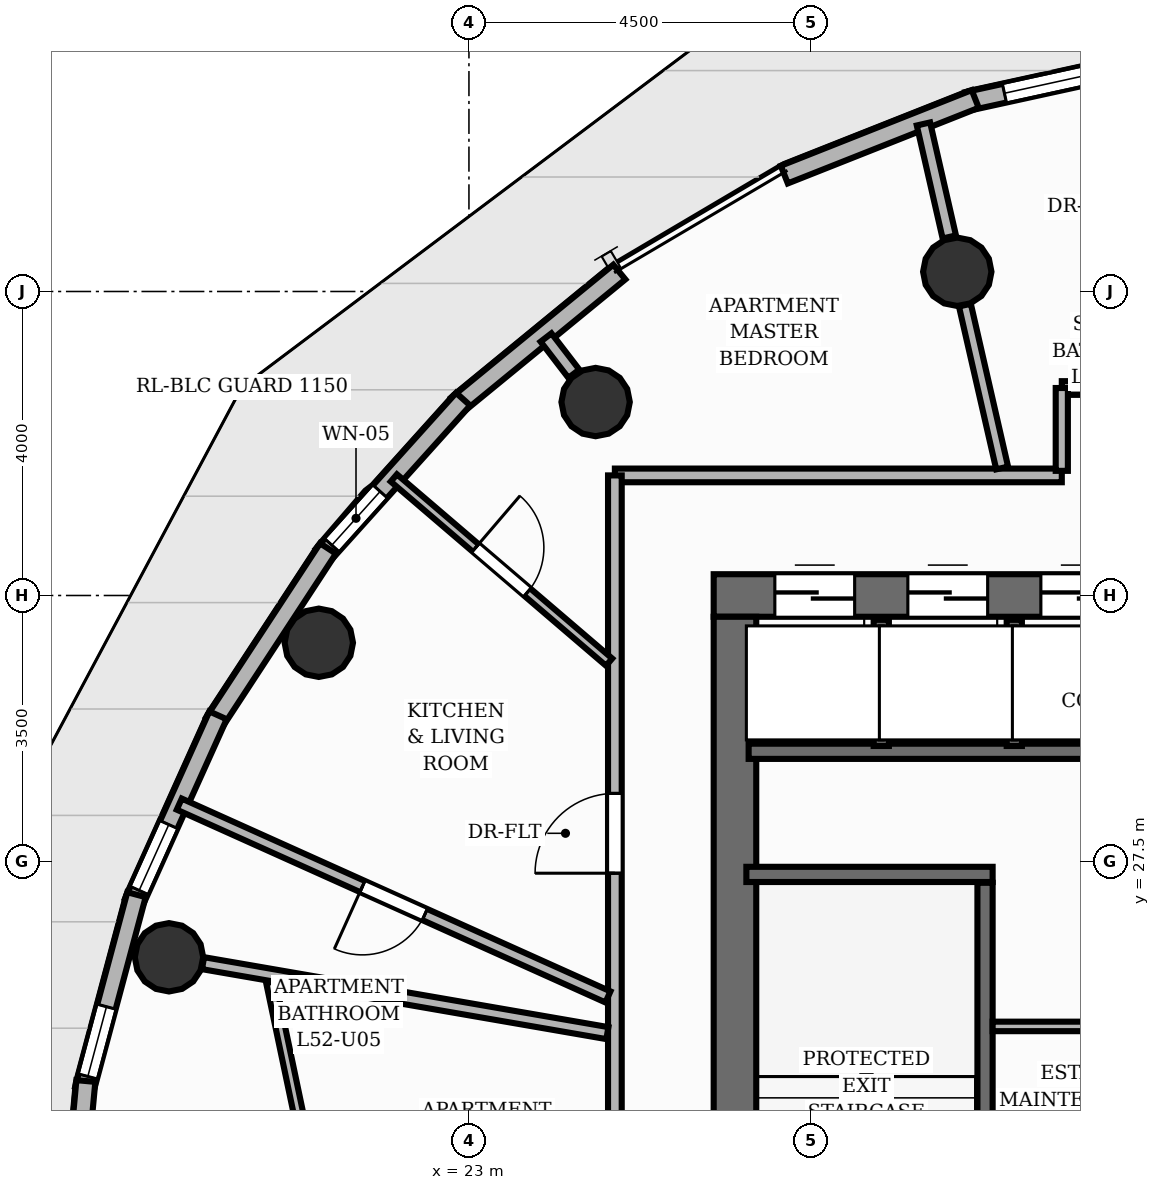
"""IFC4 building model, lengths in metres.
Left out: names, types, materials, properties, quantities, classifications, styles, units other than length and angle.
Written with IfcOpenShell. Run it as: python <this file> out.ifc"""

import sys

from ifc_helpers import new_model, si_unit, direction, frame, frame_2d, origin, origin_2d, place, context, subcontext, project, spatial, rectangle, circle, extrude, element, fill, save


model = new_model("IFC4")
c1 = context("Model", 3, precision=1e-05, world=origin(), true_north=direction((0.0, 1.0)))
c2 = subcontext(c1, "Body", "Model", "MODEL_VIEW")
j1 = project(units=[si_unit("LENGTHUNIT", "METRE"), si_unit("PLANEANGLEUNIT", "RADIAN")], contexts=[c1])
p1 = place(None, origin())
s1 = spatial("IfcSite", under=j1, at=p1, CompositionType="ELEMENT")
p2 = place(p1, origin())
s2 = spatial("IfcBuilding", under=s1, at=p2, CompositionType="ELEMENT")
p3 = place(p2, frame((0.0, 0.0, 175.84)))
s3 = spatial("IfcBuildingStorey", under=s2, at=p3, CompositionType="ELEMENT", Elevation=175.84)
p4 = place(p3, frame((26.22, 31.0, 0.0), z_axis=(0.0, 0.0, 1.0), x_axis=(1.0, 0.0, 0.0)))
e1 = element("IfcWall", 1, at=p4, inside=s3, PredefinedType="SHEAR", context=c2, shape_type="SweptSolid", body=[
    extrude(rectangle(XDim=11.56, YDim=0.56, at=frame_2d((5.78, 0.0))), origin(), (0.0, 0.0, 1.0), 3.2),
])
p5 = place(p4, frame((8.18, 0.0, 0.0)))
e2 = element("IfcOpeningElement", 2, at=p5, cuts=e1, PredefinedType="OPENING", context=c2, shape_type="SweptSolid", body=[
    extrude(rectangle(XDim=1.1, YDim=2.15, at=frame_2d((0.55, 1.075))), frame((0.0, 0.29, 0.0), z_axis=(0.0, -1.0, 0.0), x_axis=(1.0, 0.0, 0.0)), (0.0, 0.0, 1.0), 0.58),
])
p6 = place(p4, frame((0.805, 0.0, 0.0)))
e3 = element("IfcOpeningElement", 3, at=p6, cuts=e1, PredefinedType="OPENING", context=c2, shape_type="SweptSolid", body=[
    extrude(rectangle(XDim=1.05, YDim=2.15, at=frame_2d((0.525, 1.075))), frame((0.0, 0.29, 0.0), z_axis=(0.0, -1.0, 0.0), x_axis=(1.0, 0.0, 0.0)), (0.0, 0.0, 1.0), 0.58),
])
p7 = place(p4, frame((2.555, 0.0, 0.0)))
e4 = element("IfcOpeningElement", 4, at=p7, cuts=e1, PredefinedType="OPENING", context=c2, shape_type="SweptSolid", body=[
    extrude(rectangle(XDim=1.05, YDim=2.15, at=frame_2d((0.525, 1.075))), frame((0.0, 0.29, 0.0), z_axis=(0.0, -1.0, 0.0), x_axis=(1.0, 0.0, 0.0)), (0.0, 0.0, 1.0), 0.58),
])
p8 = place(p4, frame((4.305, 0.0, 0.0)))
e5 = element("IfcOpeningElement", 5, at=p8, cuts=e1, PredefinedType="OPENING", context=c2, shape_type="SweptSolid", body=[
    extrude(rectangle(XDim=1.05, YDim=2.15, at=frame_2d((0.525, 1.075))), frame((0.0, 0.29, 0.0), z_axis=(0.0, -1.0, 0.0), x_axis=(1.0, 0.0, 0.0)), (0.0, 0.0, 1.0), 0.58),
])
p9 = place(p3, frame((26.5, 17.28, 0.0), z_axis=(0.0, 0.0, 1.0), x_axis=(0.0, 1.0, 0.0)))
e6 = element("IfcWall", 6, at=p9, inside=s3, PredefinedType="SHEAR", context=c2, shape_type="SweptSolid", body=[
    extrude(rectangle(XDim=13.44, YDim=0.56, at=frame_2d((6.72, 0.0))), origin(), (0.0, 0.0, 1.0), 3.2),
])
for number, where, z_axis, x_axis in (
    (7, (29.425, 35.26, 0.0), (0.0, 0.0, 1.0), (1.0, 0.0, 0.0)),
    (8, (24.667, 33.545, 0.0), (0.0, 0.0, 1.0), (1.0, 0.0, 0.0)),
    (9, (21.025, 30.378, 0.0), (0.0, 0.0, 1.0), (1.0, 0.0, 0.0)),
    (10, (19.054, 26.24, 0.0), (0.0, 0.0, 1.0), (1.0, 0.0, 0.0)),
):
    element("IfcColumn", number, at=place(p3, frame(where, z_axis=z_axis, x_axis=x_axis)), inside=s3, PredefinedType="COLUMN", context=c2, shape_type="SweptSolid", body=[
        extrude(circle(Radius=0.45, at=origin_2d()), origin(), (0.0, 0.0, 1.0), 3.2),
    ])
p10 = place(p3, frame((29.556, 37.501, 0.0), z_axis=(0.0, 0.0, 1.0), x_axis=(0.976886196324, 0.213760051067, 0.0)))
e11 = element("IfcWall", 11, at=p10, inside=s3, PredefinedType="SOLIDWALL", context=c2, shape_type="SweptSolid", body=[
    extrude(rectangle(XDim=2.651, YDim=0.25, at=frame_2d((1.325, 0.0))), origin(), (0.0, 0.0, 1.0), 2.96),
])
p11 = place(p10, frame((0.501, 0.0, 0.85)))
e12 = element("IfcOpeningElement", 12, at=p11, cuts=e11, PredefinedType="OPENING", context=c2, shape_type="SweptSolid", body=[
    extrude(rectangle(XDim=1.65, YDim=1.55, at=frame_2d((0.825, 0.775))), frame((0.0, 0.135, 0.0), z_axis=(0.0, -1.0, 0.0), x_axis=(1.0, 0.0, 0.0)), (0.0, 0.0, 1.0), 0.27),
])
p12 = place(p3, frame((27.149, 36.538, 0.0), z_axis=(0.0, 0.0, 1.0), x_axis=(0.929693178164, 0.368334894459, 0.0)))
e13 = element("IfcWall", 13, at=p12, inside=s3, PredefinedType="SOLIDWALL", context=c2, shape_type="SweptSolid", body=[
    extrude(rectangle(XDim=2.702, YDim=0.25, at=frame_2d((1.351, 0.0))), origin(), (0.0, 0.0, 1.0), 2.96),
])
p13 = place(p3, frame((22.845, 33.508, 0.0), z_axis=(0.0, 0.0, 1.0), x_axis=(0.773491700486, 0.633806428872, 0.0)))
e14 = element("IfcWall", 14, at=p13, inside=s3, PredefinedType="SOLIDWALL", context=c2, shape_type="SweptSolid", body=[
    extrude(rectangle(XDim=2.758, YDim=0.25, at=frame_2d((1.379, 0.0))), origin(), (0.0, 0.0, 1.0), 2.96),
])
p14 = place(p3, frame((21.079, 31.532, 0.0), z_axis=(0.0, 0.0, 1.0), x_axis=(0.668764193685, 0.743474581438, 0.0)))
e15 = element("IfcWall", 15, at=p14, inside=s3, PredefinedType="SOLIDWALL", context=c2, shape_type="SweptSolid", body=[
    extrude(rectangle(XDim=2.758, YDim=0.25, at=frame_2d((1.379, 0.0))), origin(), (0.0, 0.0, 1.0), 2.96),
])
p15 = place(p14, frame((0.175, 0.0, 0.85)))
e16 = element("IfcOpeningElement", 16, at=p15, cuts=e15, PredefinedType="OPENING", context=c2, shape_type="SweptSolid", body=[
    extrude(rectangle(XDim=0.95, YDim=1.45, at=frame_2d((0.475, 0.725))), frame((0.0, 0.135, 0.0), z_axis=(0.0, -1.0, 0.0), x_axis=(1.0, 0.0, 0.0)), (0.0, 0.0, 1.0), 0.27),
])
p16 = place(p3, frame((19.646, 29.327, 0.0), z_axis=(0.0, 0.0, 1.0), x_axis=(0.547664848596, 0.83669780304, 0.0)))
e17 = element("IfcWall", 17, at=p16, inside=s3, PredefinedType="SOLIDWALL", context=c2, shape_type="SweptSolid", body=[
    extrude(rectangle(XDim=2.739, YDim=0.25, at=frame_2d((1.369, 0.0))), origin(), (0.0, 0.0, 1.0), 2.96),
])
p17 = place(p3, frame((18.589, 26.96, 0.0), z_axis=(0.0, 0.0, 1.0), x_axis=(0.410736648959, 0.911754026699, 0.0)))
e18 = element("IfcWall", 18, at=p17, inside=s3, PredefinedType="SOLIDWALL", context=c2, shape_type="SweptSolid", body=[
    extrude(rectangle(XDim=2.701, YDim=0.25, at=frame_2d((1.351, 0.0))), origin(), (0.0, 0.0, 1.0), 2.96),
])
p18 = place(p17, frame((0.175, 0.0, 0.85)))
e19 = element("IfcOpeningElement", 19, at=p18, cuts=e18, PredefinedType="OPENING", context=c2, shape_type="SweptSolid", body=[
    extrude(rectangle(XDim=0.95, YDim=1.45, at=frame_2d((0.475, 0.725))), frame((0.0, 0.135, 0.0), z_axis=(0.0, -1.0, 0.0), x_axis=(1.0, 0.0, 0.0)), (0.0, 0.0, 1.0), 0.27),
])
p19 = place(p3, frame((17.94, 24.503, 0.0), z_axis=(0.0, 0.0, 1.0), x_axis=(0.258688517816, 0.965960791518, 0.0)))
e20 = element("IfcWall", 20, at=p19, inside=s3, PredefinedType="SOLIDWALL", context=c2, shape_type="SweptSolid", body=[
    extrude(rectangle(XDim=2.651, YDim=0.25, at=frame_2d((1.326, 0.0))), origin(), (0.0, 0.0, 1.0), 2.96),
])
p20 = place(p19, frame((0.175, 0.0, 0.85)))
e21 = element("IfcOpeningElement", 21, at=p20, cuts=e20, PredefinedType="OPENING", context=c2, shape_type="SweptSolid", body=[
    extrude(rectangle(XDim=0.95, YDim=1.45, at=frame_2d((0.475, 0.725))), frame((0.0, 0.135, 0.0), z_axis=(0.0, -1.0, 0.0), x_axis=(1.0, 0.0, 0.0)), (0.0, 0.0, 1.0), 0.27),
])
p21 = place(p3, frame((17.72, 22.031, 0.0), z_axis=(0.0, 0.0, 1.0), x_axis=(0.092582110032, 0.995705053167, 0.0)))
e22 = element("IfcWall", 22, at=p21, inside=s3, PredefinedType="SOLIDWALL", context=c2, shape_type="SweptSolid", body=[
    extrude(rectangle(XDim=2.592, YDim=0.25, at=frame_2d((1.296, 0.0))), origin(), (0.0, 0.0, 1.0), 2.96),
])
p22 = place(p21, frame((0.596, 0.0, 0.85)))
e23 = element("IfcOpeningElement", 23, at=p22, cuts=e22, PredefinedType="OPENING", context=c2, shape_type="SweptSolid", body=[
    extrude(rectangle(XDim=1.4, YDim=1.55, at=frame_2d((0.7, 0.775))), frame((0.0, 0.135, 0.0), z_axis=(0.0, -1.0, 0.0), x_axis=(1.0, 0.0, 0.0)), (0.0, 0.0, 1.0), 0.27),
])
p23 = place(p3, frame((29.79, 20.78, 0.0), z_axis=(0.0, 0.0, 1.0), x_axis=(0.0, 1.0, 0.0)))
e24 = element("IfcWall", 24, at=p23, inside=s3, PredefinedType="SHEAR", context=c2, shape_type="SweptSolid", body=[
    extrude(rectangle(XDim=6.44, YDim=0.2, at=frame_2d((3.22, 0.0))), origin(), (0.0, 0.0, 1.0), 3.2),
])
p24 = place(p3, frame((26.65, 27.33, 0.0), z_axis=(0.0, 0.0, 1.0), x_axis=(1.0, 0.0, 0.0)))
e25 = element("IfcWall", 25, at=p24, inside=s3, PredefinedType="SHEAR", context=c2, shape_type="SweptSolid", body=[
    extrude(rectangle(XDim=3.24, YDim=0.2, at=frame_2d((1.62, 0.0))), origin(), (0.0, 0.0, 1.0), 3.2),
])
p25 = place(p3, frame((26.68, 28.95, 0.0), z_axis=(0.0, 0.0, 1.0), x_axis=(1.0, 0.0, 0.0)))
e26 = element("IfcWall", 26, at=p25, inside=s3, PredefinedType="SHEAR", context=c2, shape_type="SweptSolid", body=[
    extrude(rectangle(XDim=5.24, YDim=0.2, at=frame_2d((2.62, 0.0))), origin(), (0.0, 0.0, 1.0), 3.2),
])
for number, where, z_axis, x_axis in (
    (27, (28.425, 29.02, 0.0), (0.0, 0.0, 1.0), (0.0, 1.0, 0.0)),
    (28, (30.175, 29.02, 0.0), (0.0, 0.0, 1.0), (0.0, 1.0, 0.0)),
):
    element("IfcWall", number, at=place(p3, frame(where, z_axis=z_axis, x_axis=x_axis)), inside=s3, PredefinedType="SHEAR", context=c2, shape_type="SweptSolid", body=[
        extrude(rectangle(XDim=1.66, YDim=0.2, at=frame_2d((0.83, 0.0))), origin(), (0.0, 0.0, 1.0), 3.2),
    ])
p26 = place(p3, frame((29.89, 25.33, 0.0), z_axis=(0.0, 0.0, 1.0), x_axis=(1.0, 0.0, 0.0)))
e29 = element("IfcWall", 29, at=p26, inside=s3, PredefinedType="PARTITIONING", context=c2, shape_type="SweptSolid", body=[
    extrude(rectangle(XDim=1.94, YDim=0.125, at=frame_2d((0.97, 0.0))), origin(), (0.0, 0.0, 1.0), 2.955),
])
p27 = place(p3, frame((29.32, 35.718, 0.0), z_axis=(0.0, 0.0, 1.0), x_axis=(-0.222976920769, 0.974823723965, 0.0)))
e30 = element("IfcWall", 30, at=p27, inside=s3, PredefinedType="PARTITIONING", context=c2, shape_type="SweptSolid", body=[
    extrude(rectangle(XDim=1.525, YDim=0.18, at=frame_2d((0.763, 0.0))), origin(), (0.0, 0.0, 1.0), 2.403),
])
p28 = place(p3, frame((24.38, 33.918, 0.0), z_axis=(0.0, 0.0, 1.0), x_axis=(-0.609062571598, 0.793122174623, 0.0)))
e31 = element("IfcWall", 31, at=p28, inside=s3, PredefinedType="PARTITIONING", context=c2, shape_type="SweptSolid", body=[
    extrude(rectangle(XDim=0.601, YDim=0.18, at=frame_2d((0.3, 0.0))), origin(), (0.0, 0.0, 1.0), 2.403),
])
p29 = place(p3, frame((30.8, 33.73, 0.0), z_axis=(0.0, 0.0, 1.0), x_axis=(1.0, 0.0, 0.0)))
e32 = element("IfcWall", 32, at=p29, inside=s3, PredefinedType="PARTITIONING", context=c2, shape_type="SweptSolid", body=[
    extrude(rectangle(XDim=2.4, YDim=0.18, at=frame_2d((1.2, 0.0))), origin(), (0.0, 0.0, 1.0), 2.955),
])
p30 = place(p3, frame((24.92, 32.58, 0.0), z_axis=(0.0, 0.0, 1.0), x_axis=(1.0, 0.0, 0.0)))
e33 = element("IfcWall", 33, at=p30, inside=s3, PredefinedType="PARTITIONING", context=c2, shape_type="SweptSolid", body=[
    extrude(rectangle(XDim=5.88, YDim=0.18, at=frame_2d((2.94, 0.0))), origin(), (0.0, 0.0, 1.0), 2.955),
])
p31 = place(p3, frame((30.8, 32.64, 0.0), z_axis=(0.0, 0.0, 1.0), x_axis=(0.0, 1.0, 0.0)))
e34 = element("IfcWall", 34, at=p31, inside=s3, PredefinedType="PLUMBINGWALL", context=c2, shape_type="SweptSolid", body=[
    extrude(rectangle(XDim=1.09, YDim=0.16, at=frame_2d((0.545, 0.0))), origin(), (0.0, 0.0, 1.0), 2.955),
])
p32 = place(p3, frame((24.92, 19.449, 0.0), z_axis=(0.0, 0.0, 1.0), x_axis=(0.0, 1.0, 0.0)))
e35 = element("IfcWall", 35, at=p32, inside=s3, PredefinedType="PARTITIONING", context=c2, shape_type="SweptSolid", body=[
    extrude(rectangle(XDim=13.131, YDim=0.18, at=frame_2d((6.565, 0.0))), origin(), (0.0, 0.0, 1.0), 2.955),
])
p33 = place(p32, frame((7.897, 0.0, 0.0)))
e36 = element("IfcOpeningElement", 36, at=p33, cuts=e35, PredefinedType="OPENING", context=c2, shape_type="SweptSolid", body=[
    extrude(rectangle(XDim=1.05, YDim=2.15, at=frame_2d((0.525, 1.075))), frame((0.0, 0.1, 0.0), z_axis=(0.0, -1.0, 0.0), x_axis=(1.0, 0.0, 0.0)), (0.0, 0.0, 1.0), 0.2),
])
p34 = place(p3, frame((30.015, 32.677, 0.0), z_axis=(0.0, 0.0, 1.0), x_axis=(-0.222969522248, 0.974825416241, 0.0)))
e37 = element("IfcWall", 37, at=p34, inside=s3, PredefinedType="PLUMBINGWALL", context=c2, shape_type="SweptSolid", body=[
    extrude(rectangle(XDim=2.199, YDim=0.16, at=frame_2d((1.099, 0.0))), origin(), (0.0, 0.0, 1.0), 2.403),
])
p35 = place(p3, frame((24.829, 25.718, 0.0), z_axis=(0.0, 0.0, 1.0), x_axis=(-0.912008646932, 0.410170974012, 0.0)))
e38 = element("IfcWall", 38, at=p35, inside=s3, PredefinedType="PLUMBINGWALL", context=c2, shape_type="SweptSolid", body=[
    extrude(rectangle(XDim=6.184, YDim=0.16, at=frame_2d((3.092, 0.0))), origin(), (0.0, 0.0, 1.0), 2.692),
])
p36 = place(p35, frame((2.642, 0.0, 0.0)))
e39 = element("IfcOpeningElement", 39, at=p36, cuts=e38, PredefinedType="OPENING", context=c2, shape_type="SweptSolid", body=[
    extrude(rectangle(XDim=0.9, YDim=2.1, at=frame_2d((0.45, 1.05))), frame((0.0, 0.09, 0.0), z_axis=(0.0, -1.0, 0.0), x_axis=(1.0, 0.0, 0.0)), (0.0, 0.0, 1.0), 0.18),
])
p37 = place(p3, frame((22.012, 32.547, 0.0), z_axis=(0.0, 0.0, 1.0), x_axis=(0.759801913408, -0.650154637284, 0.0)))
e40 = element("IfcWall", 40, at=p37, inside=s3, PredefinedType="PARTITIONING", context=c2, shape_type="SweptSolid", body=[
    extrude(rectangle(XDim=3.727, YDim=0.125, at=frame_2d((1.864, 0.0))), origin(), (0.0, 0.0, 1.0), 2.955),
])
p38 = place(p37, frame((1.414, 0.0, 0.0)))
e41 = element("IfcOpeningElement", 41, at=p38, cuts=e40, PredefinedType="OPENING", context=c2, shape_type="SweptSolid", body=[
    extrude(rectangle(XDim=0.9, YDim=2.1, at=frame_2d((0.45, 1.05))), frame((0.0, 0.073, 0.0), z_axis=(0.0, -1.0, 0.0), x_axis=(1.0, 0.0, 0.0)), (0.0, 0.0, 1.0), 0.145),
])
p39 = place(p3, frame((24.822, 25.242, 0.0), z_axis=(0.0, 0.0, 1.0), x_axis=(-0.985362047777, 0.170474733611, 0.0)))
e42 = element("IfcWall", 42, at=p39, inside=s3, PredefinedType="PLUMBINGWALL", context=c2, shape_type="SweptSolid", body=[
    extrude(rectangle(XDim=5.399, YDim=0.16, at=frame_2d((2.7, 0.0))), origin(), (0.0, 0.0, 1.0), 2.403),
])
p40 = place(p3, frame((22.103, 17.783, 0.0), z_axis=(0.0, 0.0, 1.0), x_axis=(-0.205746874797, 0.978605243963, 0.0)))
e43 = element("IfcWall", 43, at=p40, inside=s3, PredefinedType="PARTITIONING", context=c2, shape_type="SweptSolid", body=[
    extrude(rectangle(XDim=8.309, YDim=0.125, at=frame_2d((4.154, 0.0))), origin(), (0.0, 0.0, 1.0), 2.955),
])
p41 = place(p40, frame((3.704, 0.0, 0.0)))
e44 = element("IfcOpeningElement", 44, at=p41, cuts=e43, PredefinedType="OPENING", context=c2, shape_type="SweptSolid", body=[
    extrude(rectangle(XDim=0.9, YDim=2.1, at=frame_2d((0.45, 1.05))), frame((0.0, 0.073, 0.0), z_axis=(0.0, -1.0, 0.0), x_axis=(1.0, 0.0, 0.0)), (0.0, 0.0, 1.0), 0.145),
])
p42 = place(p11, origin())
e45 = element("IfcWindow", 45, at=p42, inside=s3, PartitioningType="SINGLE_PANEL", PredefinedType="WINDOW", context=c2, shape_type="SweptSolid", body=[
    extrude(rectangle(XDim=1.65, YDim=1.55, at=frame_2d((0.825, 0.775))), frame((0.0, 0.03, 0.0), z_axis=(0.0, -1.0, 0.0), x_axis=(1.0, 0.0, 0.0)), (0.0, 0.0, 1.0), 0.06),
])
fill(e12, e45)
p43 = place(p15, origin())
e46 = element("IfcWindow", 46, at=p43, inside=s3, PartitioningType="SINGLE_PANEL", PredefinedType="WINDOW", context=c2, shape_type="SweptSolid", body=[
    extrude(rectangle(XDim=0.95, YDim=1.45, at=frame_2d((0.475, 0.725))), frame((0.0, 0.03, 0.0), z_axis=(0.0, -1.0, 0.0), x_axis=(1.0, 0.0, 0.0)), (0.0, 0.0, 1.0), 0.06),
])
fill(e16, e46)
p44 = place(p18, origin())
e47 = element("IfcWindow", 47, at=p44, inside=s3, PartitioningType="SINGLE_PANEL", PredefinedType="WINDOW", context=c2, shape_type="SweptSolid", body=[
    extrude(rectangle(XDim=0.95, YDim=1.45, at=frame_2d((0.475, 0.725))), frame((0.0, 0.03, 0.0), z_axis=(0.0, -1.0, 0.0), x_axis=(1.0, 0.0, 0.0)), (0.0, 0.0, 1.0), 0.06),
])
fill(e19, e47)
p45 = place(p20, origin())
e48 = element("IfcWindow", 48, at=p45, inside=s3, PartitioningType="SINGLE_PANEL", PredefinedType="WINDOW", context=c2, shape_type="SweptSolid", body=[
    extrude(rectangle(XDim=0.95, YDim=1.45, at=frame_2d((0.475, 0.725))), frame((0.0, 0.03, 0.0), z_axis=(0.0, -1.0, 0.0), x_axis=(1.0, 0.0, 0.0)), (0.0, 0.0, 1.0), 0.06),
])
fill(e21, e48)
p46 = place(p6, origin())
e49 = element("IfcDoor", 49, at=p46, inside=s3, OperationType="DOUBLE_DOOR_SLIDING", PredefinedType="DOOR", context=c2, shape_type="SweptSolid", body=[
    extrude(rectangle(XDim=1.05, YDim=2.15, at=frame_2d((0.525, 1.075))), frame((0.0, 0.025, 0.0), z_axis=(0.0, -1.0, 0.0), x_axis=(1.0, 0.0, 0.0)), (0.0, 0.0, 1.0), 0.05),
])
fill(e3, e49)
p47 = place(p7, origin())
e50 = element("IfcDoor", 50, at=p47, inside=s3, OperationType="DOUBLE_DOOR_SLIDING", PredefinedType="DOOR", context=c2, shape_type="SweptSolid", body=[
    extrude(rectangle(XDim=1.05, YDim=2.15, at=frame_2d((0.525, 1.075))), frame((0.0, 0.025, 0.0), z_axis=(0.0, -1.0, 0.0), x_axis=(1.0, 0.0, 0.0)), (0.0, 0.0, 1.0), 0.05),
])
fill(e4, e50)
p48 = place(p8, origin())
e51 = element("IfcDoor", 51, at=p48, inside=s3, OperationType="DOUBLE_DOOR_SLIDING", PredefinedType="DOOR", context=c2, shape_type="SweptSolid", body=[
    extrude(rectangle(XDim=1.05, YDim=2.15, at=frame_2d((0.525, 1.075))), frame((0.0, 0.025, 0.0), z_axis=(0.0, -1.0, 0.0), x_axis=(1.0, 0.0, 0.0)), (0.0, 0.0, 1.0), 0.05),
])
fill(e5, e51)
p49 = place(p33, origin())
e52 = element("IfcDoor", 52, at=p49, inside=s3, OperationType="SINGLE_SWING_LEFT", PredefinedType="DOOR", context=c2, shape_type="SweptSolid", body=[
    extrude(rectangle(XDim=1.05, YDim=2.15, at=frame_2d((0.525, 1.075))), frame((0.0, 0.025, 0.0), z_axis=(0.0, -1.0, 0.0), x_axis=(1.0, 0.0, 0.0)), (0.0, 0.0, 1.0), 0.05),
])
fill(e36, e52)
p50 = place(p36, origin())
e53 = element("IfcDoor", 53, at=p50, inside=s3, OperationType="SINGLE_SWING_RIGHT", PredefinedType="DOOR", context=c2, shape_type="SweptSolid", body=[
    extrude(rectangle(XDim=0.9, YDim=2.1, at=frame_2d((0.45, 1.05))), frame((0.0, 0.025, 0.0), z_axis=(0.0, -1.0, 0.0), x_axis=(1.0, 0.0, 0.0)), (0.0, 0.0, 1.0), 0.05),
])
fill(e39, e53)
p51 = place(p38, origin())
e54 = element("IfcDoor", 54, at=p51, inside=s3, OperationType="SINGLE_SWING_LEFT", PredefinedType="DOOR", context=c2, shape_type="SweptSolid", body=[
    extrude(rectangle(XDim=0.9, YDim=2.1, at=frame_2d((0.45, 1.05))), frame((0.0, 0.025, 0.0), z_axis=(0.0, -1.0, 0.0), x_axis=(1.0, 0.0, 0.0)), (0.0, 0.0, 1.0), 0.05),
])
fill(e41, e54)
save(model, sys.argv[1])
